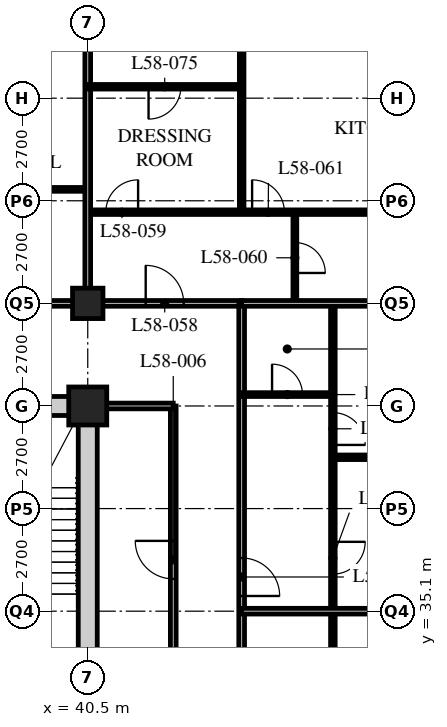
"""IFC4 building model, lengths in metres.
Left out: names, types, materials, properties, quantities, classifications, styles, units other than length and angle.
Written with IfcOpenShell. Run it as: python <this file> out.ifc"""

import sys

from ifc_helpers import new_model, si_unit, direction, frame, frame_2d, origin, origin_2d, place, context, subcontext, project, spatial, rectangle, hollow_rectangle, extrude, element, fill, save


model = new_model("IFC4")
c1 = context("Model", 3, precision=1e-05, world=origin(), true_north=direction((0.0, 1.0)))
c2 = subcontext(c1, "Body", "Model", "MODEL_VIEW")
j1 = project(units=[si_unit("LENGTHUNIT", "METRE"), si_unit("PLANEANGLEUNIT", "RADIAN")], contexts=[c1])
p1 = place(None, origin())
s1 = spatial("IfcSite", under=j1, at=p1, CompositionType="ELEMENT")
p2 = place(p1, origin())
s2 = spatial("IfcBuilding", under=s1, at=p2, CompositionType="ELEMENT")
p3 = place(p2, frame((0.0, 0.0, 224.4)))
s3 = spatial("IfcBuildingStorey", under=s2, at=p3, CompositionType="ELEMENT", Elevation=224.4)
p4 = place(p3, frame((40.5, 40.5, 0.0), z_axis=(0.0, 0.0, 1.0), x_axis=(1.0, 0.0, 0.0)))
e1 = element("IfcColumn", 1, at=p4, inside=s3, PredefinedType="COLUMN", context=c2, shape_type="SweptSolid", body=[
    extrude(hollow_rectangle(XDim=1.0, YDim=1.0, WallThickness=0.1, at=origin_2d()), origin(), (0.0, 0.0, 1.0), 3.6),
])
p5 = place(p3, frame((40.5, 43.2, 0.0), z_axis=(0.0, 0.0, 1.0), x_axis=(1.0, 0.0, 0.0)))
e2 = element("IfcColumn", 2, at=p5, inside=s3, PredefinedType="COLUMN", context=c2, shape_type="SweptSolid", body=[
    extrude(hollow_rectangle(XDim=0.8, YDim=0.8, WallThickness=0.08, at=origin_2d()), origin(), (0.0, 0.0, 1.0), 3.6),
])
p6 = place(p3, frame((8.1, 43.2, 0.0), z_axis=(0.0, 0.0, 1.0), x_axis=(1.0, 0.0, 0.0)))
e3 = element("IfcWall", 3, at=p6, inside=s3, PredefinedType="PARTITIONING", context=c2, shape_type="SweptSolid", body=[
    extrude(rectangle(XDim=36.45, YDim=0.15, at=frame_2d((18.225, 0.0))), origin(), (0.0, 0.0, 1.0), 2.628),
])
p7 = place(p6, frame((4.45, 0.0, 0.0)))
e4 = element("IfcOpeningElement", 4, at=p7, cuts=e3, PredefinedType="OPENING", context=c2, shape_type="SweptSolid", body=[
    extrude(rectangle(XDim=1.0, YDim=2.1, at=frame_2d((0.5, 1.05))), frame((0.0, 0.085, 0.0), z_axis=(0.0, -1.0, 0.0), x_axis=(1.0, 0.0, 0.0)), (0.0, 0.0, 1.0), 0.17),
])
p8 = place(p6, frame((17.1, 0.0, 0.0)))
e5 = element("IfcOpeningElement", 5, at=p8, cuts=e3, PredefinedType="OPENING", context=c2, shape_type="SweptSolid", body=[
    extrude(rectangle(XDim=1.0, YDim=2.1, at=frame_2d((0.5, 1.05))), frame((0.0, 0.085, 0.0), z_axis=(0.0, -1.0, 0.0), x_axis=(1.0, 0.0, 0.0)), (0.0, 0.0, 1.0), 0.17),
])
p9 = place(p6, frame((29.05, 0.0, 0.0)))
e6 = element("IfcOpeningElement", 6, at=p9, cuts=e3, PredefinedType="OPENING", context=c2, shape_type="SweptSolid", body=[
    extrude(rectangle(XDim=1.0, YDim=2.1, at=frame_2d((0.5, 1.05))), frame((0.0, 0.085, 0.0), z_axis=(0.0, -1.0, 0.0), x_axis=(1.0, 0.0, 0.0)), (0.0, 0.0, 1.0), 0.17),
])
p10 = place(p6, frame((33.925, 0.0, 0.0)))
e7 = element("IfcOpeningElement", 7, at=p10, cuts=e3, PredefinedType="OPENING", context=c2, shape_type="SweptSolid", body=[
    extrude(rectangle(XDim=1.0, YDim=2.1, at=frame_2d((0.5, 1.05))), frame((0.0, 0.085, 0.0), z_axis=(0.0, -1.0, 0.0), x_axis=(1.0, 0.0, 0.0)), (0.0, 0.0, 1.0), 0.17),
])
p11 = place(p6, frame((1.525, 0.0, 0.0)))
e8 = element("IfcOpeningElement", 8, at=p11, cuts=e3, PredefinedType="OPENING", context=c2, shape_type="SweptSolid", body=[
    extrude(rectangle(XDim=1.0, YDim=2.1, at=frame_2d((0.5, 1.05))), frame((0.0, 0.085, 0.0), z_axis=(0.0, -1.0, 0.0), x_axis=(1.0, 0.0, 0.0)), (0.0, 0.0, 1.0), 0.17),
])
p12 = place(p3, frame((44.55, 18.9, 0.0), z_axis=(0.0, 0.0, 1.0), x_axis=(0.0, 1.0, 0.0)))
e9 = element("IfcWall", 9, at=p12, inside=s3, PredefinedType="PARTITIONING", context=c2, shape_type="SweptSolid", body=[
    extrude(rectangle(XDim=24.3, YDim=0.15, at=frame_2d((12.15, 0.0))), origin(), (0.0, 0.0, 1.0), 3.39),
])
p13 = place(p12, frame((0.4, 0.0, 0.0)))
e10 = element("IfcOpeningElement", 10, at=p13, cuts=e9, PredefinedType="OPENING", context=c2, shape_type="SweptSolid", body=[
    extrude(rectangle(XDim=1.0, YDim=2.1, at=frame_2d((0.5, 1.05))), frame((0.0, 0.085, 0.0), z_axis=(0.0, -1.0, 0.0), x_axis=(1.0, 0.0, 0.0)), (0.0, 0.0, 1.0), 0.17),
])
p14 = place(p12, frame((16.6, 0.0, 0.0)))
e11 = element("IfcOpeningElement", 11, at=p14, cuts=e9, PredefinedType="OPENING", context=c2, shape_type="SweptSolid", body=[
    extrude(rectangle(XDim=1.0, YDim=2.1, at=frame_2d((0.5, 1.05))), frame((0.0, 0.085, 0.0), z_axis=(0.0, -1.0, 0.0), x_axis=(1.0, 0.0, 0.0)), (0.0, 0.0, 1.0), 0.17),
])
p15 = place(p3, frame((42.75, 20.7, 0.0), z_axis=(0.0, 0.0, 1.0), x_axis=(0.0, 1.0, 0.0)))
e12 = element("IfcWall", 12, at=p15, inside=s3, PredefinedType="PARTITIONING", context=c2, shape_type="SweptSolid", body=[
    extrude(rectangle(XDim=19.8, YDim=0.15, at=frame_2d((9.9, 0.0))), origin(), (0.0, 0.0, 1.0), 3.39),
])
p16 = place(p15, frame((7.15, 0.0, 0.0)))
e13 = element("IfcOpeningElement", 13, at=p16, cuts=e12, PredefinedType="OPENING", context=c2, shape_type="SweptSolid", body=[
    extrude(rectangle(XDim=1.0, YDim=2.1, at=frame_2d((0.5, 1.05))), frame((0.0, 0.085, 0.0), z_axis=(0.0, -1.0, 0.0), x_axis=(1.0, 0.0, 0.0)), (0.0, 0.0, 1.0), 0.17),
])
p17 = place(p15, frame((15.25, 0.0, 0.0)))
e14 = element("IfcOpeningElement", 14, at=p17, cuts=e12, PredefinedType="OPENING", context=c2, shape_type="SweptSolid", body=[
    extrude(rectangle(XDim=1.0, YDim=2.1, at=frame_2d((0.5, 1.05))), frame((0.0, 0.085, 0.0), z_axis=(0.0, -1.0, 0.0), x_axis=(1.0, 0.0, 0.0)), (0.0, 0.0, 1.0), 0.17),
])
p18 = place(p3, frame((42.75, 40.5, 0.0), z_axis=(0.0, 0.0, 1.0), x_axis=(-1.0, 0.0, 0.0)))
e15 = element("IfcWall", 15, at=p18, inside=s3, PredefinedType="PARTITIONING", context=c2, shape_type="SweptSolid", body=[
    extrude(rectangle(XDim=2.05, YDim=0.15, at=frame_2d((1.025, 0.0))), origin(), (0.0, 0.0, 1.0), 3.39),
])
p19 = place(p3, frame((38.3, 46.2, 0.0), z_axis=(0.0, 0.0, 1.0), x_axis=(1.0, 0.0, 0.0)))
e16 = element("IfcWall", 16, at=p19, inside=s3, PredefinedType="PARTITIONING", context=c2, shape_type="SweptSolid", body=[
    extrude(rectangle(XDim=2.2, YDim=0.1, at=frame_2d((1.1, 0.0))), origin(), (0.0, 0.0, 1.0), 3.39),
])
p20 = place(p3, frame((46.95, 18.9, 0.0), z_axis=(0.0, 0.0, 1.0), x_axis=(0.0, 1.0, 0.0)))
e17 = element("IfcWall", 17, at=p20, inside=s3, PredefinedType="PARTITIONING", context=c2, shape_type="SweptSolid", body=[
    extrude(rectangle(XDim=24.3, YDim=0.12, at=frame_2d((12.15, 0.0))), origin(), (0.0, 0.0, 1.0), 3.39),
])
p21 = place(p20, frame((0.975, 0.0, 0.0)))
e18 = element("IfcOpeningElement", 18, at=p21, cuts=e17, PredefinedType="OPENING", context=c2, shape_type="SweptSolid", body=[
    extrude(rectangle(XDim=0.85, YDim=2.1, at=frame_2d((0.425, 1.05))), frame((0.0, 0.07, 0.0), z_axis=(0.0, -1.0, 0.0), x_axis=(1.0, 0.0, 0.0)), (0.0, 0.0, 1.0), 0.14),
])
p22 = place(p20, frame((8.425, 0.0, 0.0)))
e19 = element("IfcOpeningElement", 19, at=p22, cuts=e17, PredefinedType="OPENING", context=c2, shape_type="SweptSolid", body=[
    extrude(rectangle(XDim=0.85, YDim=2.1, at=frame_2d((0.425, 1.05))), frame((0.0, 0.07, 0.0), z_axis=(0.0, -1.0, 0.0), x_axis=(1.0, 0.0, 0.0)), (0.0, 0.0, 1.0), 0.14),
])
p23 = place(p20, frame((12.475, 0.0, 0.0)))
e20 = element("IfcOpeningElement", 20, at=p23, cuts=e17, PredefinedType="OPENING", context=c2, shape_type="SweptSolid", body=[
    extrude(rectangle(XDim=0.85, YDim=2.1, at=frame_2d((0.425, 1.05))), frame((0.0, 0.07, 0.0), z_axis=(0.0, -1.0, 0.0), x_axis=(1.0, 0.0, 0.0)), (0.0, 0.0, 1.0), 0.14),
])
p24 = place(p20, frame((17.175, 0.0, 0.0)))
e21 = element("IfcOpeningElement", 21, at=p24, cuts=e17, PredefinedType="OPENING", context=c2, shape_type="SweptSolid", body=[
    extrude(rectangle(XDim=0.85, YDim=2.1, at=frame_2d((0.425, 1.05))), frame((0.0, 0.07, 0.0), z_axis=(0.0, -1.0, 0.0), x_axis=(1.0, 0.0, 0.0)), (0.0, 0.0, 1.0), 0.14),
])
p25 = place(p20, frame((20.575, 0.0, 0.0)))
e22 = element("IfcOpeningElement", 22, at=p25, cuts=e17, PredefinedType="OPENING", context=c2, shape_type="SweptSolid", body=[
    extrude(rectangle(XDim=0.85, YDim=2.1, at=frame_2d((0.425, 1.05))), frame((0.0, 0.07, 0.0), z_axis=(0.0, -1.0, 0.0), x_axis=(1.0, 0.0, 0.0)), (0.0, 0.0, 1.0), 0.14),
])
p26 = place(p3, frame((44.55, 35.1, 0.0), z_axis=(0.0, 0.0, 1.0), x_axis=(1.0, 0.0, 0.0)))
e23 = element("IfcWall", 23, at=p26, inside=s3, PredefinedType="PARTITIONING", context=c2, shape_type="SweptSolid", body=[
    extrude(rectangle(XDim=11.85, YDim=0.15, at=frame_2d((5.925, 0.0))), origin(), (0.0, 0.0, 1.0), 2.628),
])
p27 = place(p3, frame((44.55, 40.8, 0.0), z_axis=(0.0, 0.0, 1.0), x_axis=(1.0, 0.0, 0.0)))
e24 = element("IfcWall", 24, at=p27, inside=s3, PredefinedType="PARTITIONING", context=c2, shape_type="SweptSolid", body=[
    extrude(rectangle(XDim=2.4, YDim=0.1, at=frame_2d((1.2, 0.0))), origin(), (0.0, 0.0, 1.0), 3.39),
])
p28 = place(p27, frame((0.8, 0.0, 0.0)))
e25 = element("IfcOpeningElement", 25, at=p28, cuts=e24, PredefinedType="OPENING", context=c2, shape_type="SweptSolid", body=[
    extrude(rectangle(XDim=0.8, YDim=2.1, at=frame_2d((0.4, 1.05))), frame((0.0, 0.06, 0.0), z_axis=(0.0, -1.0, 0.0), x_axis=(1.0, 0.0, 0.0)), (0.0, 0.0, 1.0), 0.12),
])
p29 = place(p3, frame((46.95, 39.15, 0.0), z_axis=(0.0, 0.0, 1.0), x_axis=(1.0, 0.0, 0.0)))
e26 = element("IfcWall", 26, at=p29, inside=s3, PredefinedType="PARTITIONING", context=c2, shape_type="SweptSolid", body=[
    extrude(rectangle(XDim=9.45, YDim=0.12, at=frame_2d((4.725, 0.0))), origin(), (0.0, 0.0, 1.0), 3.39),
])
p30 = place(p3, frame((40.5, 45.6, 0.0), z_axis=(0.0, 0.0, 1.0), x_axis=(1.0, 0.0, 0.0)))
e27 = element("IfcWall", 27, at=p30, inside=s3, PredefinedType="PARTITIONING", context=c2, shape_type="SweptSolid", body=[
    extrude(rectangle(XDim=8.05, YDim=0.12, at=frame_2d((4.025, 0.0))), origin(), (0.0, 0.0, 1.0), 3.39),
])
p31 = place(p30, frame((0.475, 0.0, 0.0)))
e28 = element("IfcOpeningElement", 28, at=p31, cuts=e27, PredefinedType="OPENING", context=c2, shape_type="SweptSolid", body=[
    extrude(rectangle(XDim=0.85, YDim=2.1, at=frame_2d((0.425, 1.05))), frame((0.0, 0.07, 0.0), z_axis=(0.0, -1.0, 0.0), x_axis=(1.0, 0.0, 0.0)), (0.0, 0.0, 1.0), 0.14),
])
p32 = place(p30, frame((4.325, 0.0, 0.0)))
e29 = element("IfcOpeningElement", 29, at=p32, cuts=e27, PredefinedType="OPENING", context=c2, shape_type="SweptSolid", body=[
    extrude(rectangle(XDim=0.85, YDim=2.1, at=frame_2d((0.425, 1.05))), frame((0.0, 0.07, 0.0), z_axis=(0.0, -1.0, 0.0), x_axis=(1.0, 0.0, 0.0)), (0.0, 0.0, 1.0), 0.14),
])
p33 = place(p3, frame((45.95, 43.2, 0.0), z_axis=(0.0, 0.0, 1.0), x_axis=(0.0, 1.0, 0.0)))
e30 = element("IfcWall", 30, at=p33, inside=s3, PredefinedType="PARTITIONING", context=c2, shape_type="SweptSolid", body=[
    extrude(rectangle(XDim=2.4, YDim=0.1, at=frame_2d((1.2, 0.0))), origin(), (0.0, 0.0, 1.0), 3.39),
])
p34 = place(p33, frame((0.8, 0.0, 0.0)))
e31 = element("IfcOpeningElement", 31, at=p34, cuts=e30, PredefinedType="OPENING", context=c2, shape_type="SweptSolid", body=[
    extrude(rectangle(XDim=0.8, YDim=2.1, at=frame_2d((0.4, 1.05))), frame((0.0, 0.06, 0.0), z_axis=(0.0, -1.0, 0.0), x_axis=(1.0, 0.0, 0.0)), (0.0, 0.0, 1.0), 0.12),
])
p35 = place(p3, frame((44.55, 45.6, 0.0), z_axis=(0.0, 0.0, 1.0), x_axis=(0.0, 1.0, 0.0)))
e32 = element("IfcWall", 32, at=p35, inside=s3, PredefinedType="PARTITIONING", context=c2, shape_type="SweptSolid", body=[
    extrude(rectangle(XDim=13.5, YDim=0.12, at=frame_2d((6.75, 0.0))), origin(), (0.0, 0.0, 1.0), 3.39),
])
p36 = place(p3, frame((44.55, 43.2, 0.0), z_axis=(0.0, 0.0, 1.0), x_axis=(1.0, 0.0, 0.0)))
e33 = element("IfcWall", 33, at=p36, inside=s3, PredefinedType="PARTITIONING", context=c2, shape_type="SweptSolid", body=[
    extrude(rectangle(XDim=11.85, YDim=0.15, at=frame_2d((5.925, 0.0))), origin(), (0.0, 0.0, 1.0), 2.628),
])
p37 = place(p3, frame((40.5, 43.2, 0.0), z_axis=(0.0, 0.0, 1.0), x_axis=(0.0, 1.0, 0.0)))
e34 = element("IfcWall", 34, at=p37, inside=s3, PredefinedType="PARTITIONING", context=c2, shape_type="SweptSolid", body=[
    extrude(rectangle(XDim=15.9, YDim=0.15, at=frame_2d((7.95, 0.0))), origin(), (0.0, 0.0, 1.0), 2.628),
])
p38 = place(p3, frame((40.5, 48.9, 0.0), z_axis=(0.0, 0.0, 1.0), x_axis=(1.0, 0.0, 0.0)))
e35 = element("IfcWall", 35, at=p38, inside=s3, PredefinedType="PARTITIONING", context=c2, shape_type="SweptSolid", body=[
    extrude(rectangle(XDim=4.05, YDim=0.12, at=frame_2d((2.025, 0.0))), origin(), (0.0, 0.0, 1.0), 3.39),
])
p39 = place(p38, frame((1.6, 0.0, 0.0)))
e36 = element("IfcOpeningElement", 36, at=p39, cuts=e35, PredefinedType="OPENING", context=c2, shape_type="SweptSolid", body=[
    extrude(rectangle(XDim=0.85, YDim=2.1, at=frame_2d((0.425, 1.05))), frame((0.0, 0.07, 0.0), z_axis=(0.0, -1.0, 0.0), x_axis=(1.0, 0.0, 0.0)), (0.0, 0.0, 1.0), 0.14),
])
p40 = place(p3, frame((15.95, 40.5, 0.0), z_axis=(0.0, 0.0, 1.0), x_axis=(1.0, 0.0, 0.0)))
e37 = element("IfcWall", 37, at=p40, inside=s3, PredefinedType="SOLIDWALL", context=c2, shape_type="SweptSolid", body=[
    extrude(rectangle(XDim=24.8, YDim=0.5, at=frame_2d((12.4, 0.0))), origin(), (0.0, 0.0, 1.0), 2.628),
])
p41 = place(p40, frame((11.5, 0.0, 0.0)))
e38 = element("IfcOpeningElement", 38, at=p41, cuts=e37, PredefinedType="OPENING", context=c2, shape_type="SweptSolid", body=[
    extrude(rectangle(XDim=1.8, YDim=2.4, at=frame_2d((0.9, 1.2))), frame((0.0, 0.26, 0.0), z_axis=(0.0, -1.0, 0.0), x_axis=(1.0, 0.0, 0.0)), (0.0, 0.0, 1.0), 0.52),
])
p42 = place(p3, frame((40.5, 24.55, 0.0), z_axis=(0.0, 0.0, 1.0), x_axis=(0.0, 1.0, 0.0)))
e39 = element("IfcWall", 39, at=p42, inside=s3, PredefinedType="SOLIDWALL", context=c2, shape_type="SweptSolid", body=[
    extrude(rectangle(XDim=15.7, YDim=0.5, at=frame_2d((7.85, 0.0))), origin(), (0.0, 0.0, 1.0), 2.628),
])
p43 = place(p17, origin())
e40 = element("IfcDoor", 40, at=p43, inside=s3, OperationType="SINGLE_SWING_RIGHT", PredefinedType="DOOR", context=c2, shape_type="SweptSolid", body=[
    extrude(rectangle(XDim=1.0, YDim=2.1, at=frame_2d((0.5, 1.05))), frame((0.0, 0.025, 0.0), z_axis=(0.0, -1.0, 0.0), x_axis=(1.0, 0.0, 0.0)), (0.0, 0.0, 1.0), 0.05),
])
fill(e14, e40)
p44 = place(p28, origin())
e41 = element("IfcDoor", 41, at=p44, inside=s3, OperationType="SINGLE_SWING_LEFT", PredefinedType="DOOR", context=c2, shape_type="SweptSolid", body=[
    extrude(rectangle(XDim=0.8, YDim=2.1, at=frame_2d((0.4, 1.05))), frame((0.0, 0.025, 0.0), z_axis=(0.0, -1.0, 0.0), x_axis=(1.0, 0.0, 0.0)), (0.0, 0.0, 1.0), 0.05),
])
fill(e25, e41)
p45 = place(p14, origin())
e42 = element("IfcDoor", 42, at=p45, inside=s3, OperationType="SINGLE_SWING_RIGHT", PredefinedType="DOOR", context=c2, shape_type="SweptSolid", body=[
    extrude(rectangle(XDim=1.0, YDim=2.1, at=frame_2d((0.5, 1.05))), frame((0.0, 0.025, 0.0), z_axis=(0.0, -1.0, 0.0), x_axis=(1.0, 0.0, 0.0)), (0.0, 0.0, 1.0), 0.05),
])
fill(e11, e42)
p46 = place(p24, origin())
e43 = element("IfcDoor", 43, at=p46, inside=s3, OperationType="SINGLE_SWING_LEFT", PredefinedType="DOOR", context=c2, shape_type="SweptSolid", body=[
    extrude(rectangle(XDim=0.85, YDim=2.1, at=frame_2d((0.425, 1.05))), frame((0.0, 0.025, 0.0), z_axis=(0.0, -1.0, 0.0), x_axis=(1.0, 0.0, 0.0)), (0.0, 0.0, 1.0), 0.05),
])
fill(e21, e43)
p47 = place(p25, origin())
e44 = element("IfcDoor", 44, at=p47, inside=s3, OperationType="SINGLE_SWING_RIGHT", PredefinedType="DOOR", context=c2, shape_type="SweptSolid", body=[
    extrude(rectangle(XDim=0.85, YDim=2.1, at=frame_2d((0.425, 1.05))), frame((0.0, 0.025, 0.0), z_axis=(0.0, -1.0, 0.0), x_axis=(1.0, 0.0, 0.0)), (0.0, 0.0, 1.0), 0.05),
])
fill(e22, e44)
p48 = place(p10, origin())
e45 = element("IfcDoor", 45, at=p48, inside=s3, OperationType="SINGLE_SWING_LEFT", PredefinedType="DOOR", context=c2, shape_type="SweptSolid", body=[
    extrude(rectangle(XDim=1.0, YDim=2.1, at=frame_2d((0.5, 1.05))), frame((0.0, 0.025, 0.0), z_axis=(0.0, -1.0, 0.0), x_axis=(1.0, 0.0, 0.0)), (0.0, 0.0, 1.0), 0.05),
])
fill(e7, e45)
p49 = place(p31, origin())
e46 = element("IfcDoor", 46, at=p49, inside=s3, OperationType="SINGLE_SWING_RIGHT", PredefinedType="DOOR", context=c2, shape_type="SweptSolid", body=[
    extrude(rectangle(XDim=0.85, YDim=2.1, at=frame_2d((0.425, 1.05))), frame((0.0, 0.025, 0.0), z_axis=(0.0, -1.0, 0.0), x_axis=(1.0, 0.0, 0.0)), (0.0, 0.0, 1.0), 0.05),
])
fill(e28, e46)
p50 = place(p34, origin())
e47 = element("IfcDoor", 47, at=p50, inside=s3, OperationType="SINGLE_SWING_RIGHT", PredefinedType="DOOR", context=c2, shape_type="SweptSolid", body=[
    extrude(rectangle(XDim=0.8, YDim=2.1, at=frame_2d((0.4, 1.05))), frame((0.0, 0.025, 0.0), z_axis=(0.0, -1.0, 0.0), x_axis=(1.0, 0.0, 0.0)), (0.0, 0.0, 1.0), 0.05),
])
fill(e31, e47)
p51 = place(p32, origin())
e48 = element("IfcDoor", 48, at=p51, inside=s3, OperationType="SINGLE_SWING_LEFT", PredefinedType="DOOR", context=c2, shape_type="SweptSolid", body=[
    extrude(rectangle(XDim=0.85, YDim=2.1, at=frame_2d((0.425, 1.05))), frame((0.0, 0.025, 0.0), z_axis=(0.0, -1.0, 0.0), x_axis=(1.0, 0.0, 0.0)), (0.0, 0.0, 1.0), 0.05),
])
fill(e29, e48)
p52 = place(p39, origin())
e49 = element("IfcDoor", 49, at=p52, inside=s3, OperationType="SINGLE_SWING_RIGHT", PredefinedType="DOOR", context=c2, shape_type="SweptSolid", body=[
    extrude(rectangle(XDim=0.85, YDim=2.1, at=frame_2d((0.425, 1.05))), frame((0.0, 0.025, 0.0), z_axis=(0.0, -1.0, 0.0), x_axis=(1.0, 0.0, 0.0)), (0.0, 0.0, 1.0), 0.05),
])
fill(e36, e49)
save(model, sys.argv[1])
